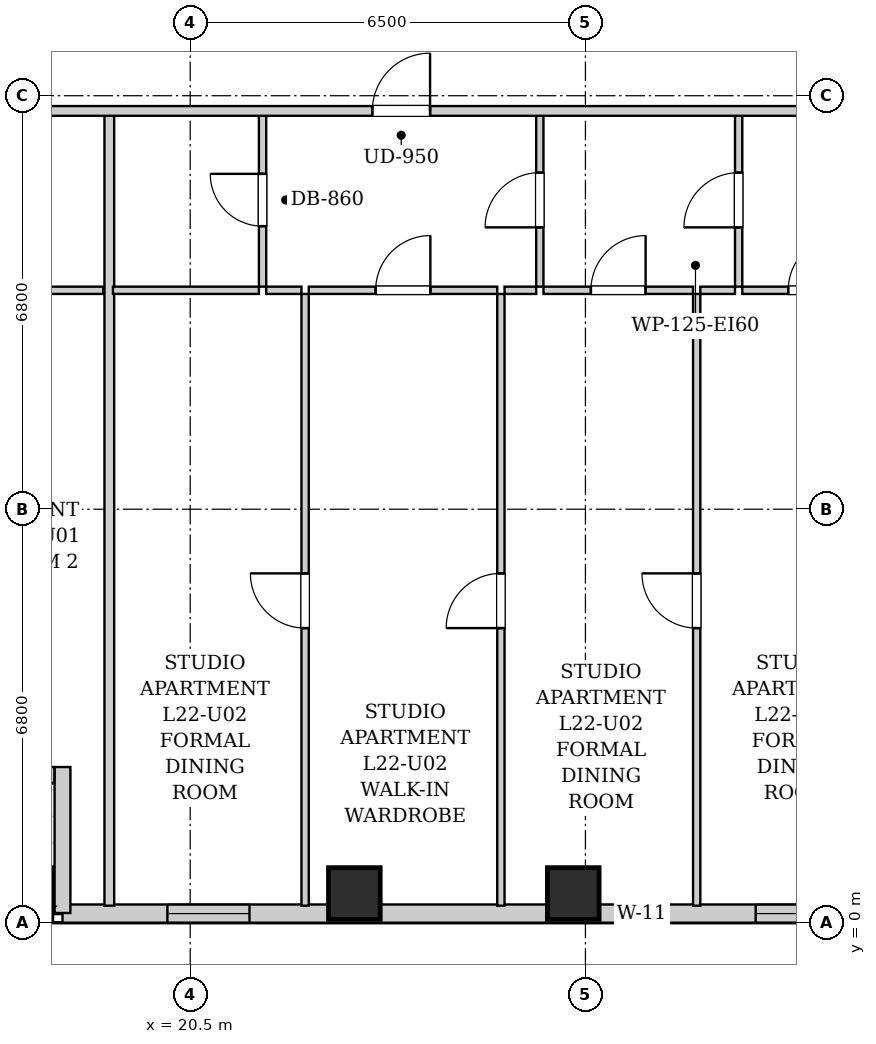
"""IFC4 building model, lengths in metres.
Left out: names, types, materials, properties, quantities, classifications, styles, units other than length and angle.
Written with IfcOpenShell. Run it as: python <this file> out.ifc"""

import sys

from ifc_helpers import new_model, si_unit, direction, frame, frame_2d, origin, origin_2d, place, context, subcontext, project, spatial, rectangle, extrude, element, fill, save


model = new_model("IFC4")
c1 = context("Model", 3, precision=1e-05, world=origin(), true_north=direction((0.0, 1.0)))
c2 = subcontext(c1, "Body", "Model", "MODEL_VIEW")
j1 = project(units=[si_unit("LENGTHUNIT", "METRE"), si_unit("PLANEANGLEUNIT", "RADIAN")], contexts=[c1])
p1 = place(None, origin())
s1 = spatial("IfcSite", under=j1, at=p1, CompositionType="ELEMENT")
p2 = place(p1, origin())
s2 = spatial("IfcBuilding", under=s1, at=p2, CompositionType="ELEMENT")
p3 = place(p2, frame((0.0, 0.0, 81.5)))
s3 = spatial("IfcBuildingStorey", under=s2, at=p3, CompositionType="ELEMENT", Elevation=81.5)
for number, where, z_axis, x_axis in (
    (1, (23.2, 0.48, 0.0), (0.0, 0.0, 1.0), (1.0, 0.0, 0.0)),
    (2, (26.8, 0.48, 0.0), (0.0, 0.0, 1.0), (1.0, 0.0, 0.0)),
):
    element("IfcColumn", number, at=place(p3, frame(where, z_axis=z_axis, x_axis=x_axis)), inside=s3, PredefinedType="COLUMN", context=c2, shape_type="SweptSolid", body=[
        extrude(rectangle(XDim=0.85, YDim=0.85, at=origin_2d()), origin(), (0.0, 0.0, 1.0), 3.2),
    ])
p4 = place(p3, frame((40.9, 0.15, 0.0), z_axis=(0.0, 0.0, 1.0), x_axis=(-1.0, 0.0, 0.0)))
e3 = element("IfcWall", 3, at=p4, inside=s3, PredefinedType="SOLIDWALL", context=c2, shape_type="SweptSolid", body=[
    extrude(rectangle(XDim=22.5, YDim=0.3, at=frame_2d((11.25, 0.0))), origin(), (0.0, 0.0, 1.0), 2.94),
])
p5 = place(p4, frame((19.425, 0.0, 0.55)))
e4 = element("IfcOpeningElement", 4, at=p5, cuts=e3, PredefinedType="OPENING", context=c2, shape_type="SweptSolid", body=[
    extrude(rectangle(XDim=1.35, YDim=1.2, at=frame_2d((0.675, 0.6))), frame((0.0, 0.16, 0.0), z_axis=(0.0, -1.0, 0.0), x_axis=(1.0, 0.0, 0.0)), (0.0, 0.0, 1.0), 0.32),
])
p6 = place(p4, frame((12.55, 0.0, 0.55)))
e5 = element("IfcOpeningElement", 5, at=p6, cuts=e3, PredefinedType="OPENING", context=c2, shape_type="SweptSolid", body=[
    extrude(rectangle(XDim=0.85, YDim=1.2, at=frame_2d((0.425, 0.6))), frame((0.0, 0.16, 0.0), z_axis=(0.0, -1.0, 0.0), x_axis=(1.0, 0.0, 0.0)), (0.0, 0.0, 1.0), 0.32),
])
p7 = place(p4, frame((9.75, 0.0, 0.55)))
e6 = element("IfcOpeningElement", 6, at=p7, cuts=e3, PredefinedType="OPENING", context=c2, shape_type="SweptSolid", body=[
    extrude(rectangle(XDim=1.35, YDim=1.2, at=frame_2d((0.675, 0.6))), frame((0.0, 0.16, 0.0), z_axis=(0.0, -1.0, 0.0), x_axis=(1.0, 0.0, 0.0)), (0.0, 0.0, 1.0), 0.32),
])
p8 = place(p4, frame((6.265, 0.0, 0.55)))
e7 = element("IfcOpeningElement", 7, at=p8, cuts=e3, PredefinedType="OPENING", context=c2, shape_type="SweptSolid", body=[
    extrude(rectangle(XDim=0.85, YDim=1.2, at=frame_2d((0.425, 0.6))), frame((0.0, 0.16, 0.0), z_axis=(0.0, -1.0, 0.0), x_axis=(1.0, 0.0, 0.0)), (0.0, 0.0, 1.0), 0.32),
])
p9 = place(p4, frame((2.325, 0.0, 0.55)))
e8 = element("IfcOpeningElement", 8, at=p9, cuts=e3, PredefinedType="OPENING", context=c2, shape_type="SweptSolid", body=[
    extrude(rectangle(XDim=1.35, YDim=1.2, at=frame_2d((0.675, 0.6))), frame((0.0, 0.16, 0.0), z_axis=(0.0, -1.0, 0.0), x_axis=(1.0, 0.0, 0.0)), (0.0, 0.0, 1.0), 0.32),
])
p10 = place(p3, frame((18.4, 0.16, 0.0), z_axis=(0.0, 0.0, 1.0), x_axis=(0.0, 1.0, 0.0)))
e9 = element("IfcWall", 9, at=p10, inside=s3, PredefinedType="SOLIDWALL", context=c2, shape_type="SweptSolid", body=[
    extrude(rectangle(XDim=2.4, YDim=0.26, at=frame_2d((1.2, 0.0))), origin(), (0.0, 0.0, 1.0), 2.94),
])
p11 = place(p3, frame((18.266, 2.43, 0.0), z_axis=(0.0, 0.0, 1.0), x_axis=(-1.0, 0.0, 0.0)))
e10 = element("IfcWall", 10, at=p11, inside=s3, PredefinedType="SOLIDWALL", context=c2, shape_type="SweptSolid", body=[
    extrude(rectangle(XDim=4.882, YDim=0.26, at=frame_2d((2.441, 0.0))), origin(), (0.0, 0.0, 1.0), 2.94),
])
p12 = place(p11, frame((2.316, 0.0, 0.0)))
e11 = element("IfcOpeningElement", 11, at=p12, cuts=e10, PredefinedType="OPENING", context=c2, shape_type="SweptSolid", body=[
    extrude(rectangle(XDim=1.1, YDim=2.0, at=frame_2d((0.55, 1.0))), frame((0.0, 0.14, 0.0), z_axis=(0.0, -1.0, 0.0), x_axis=(1.0, 0.0, 0.0)), (0.0, 0.0, 1.0), 0.28),
])
p13 = place(p11, frame((3.576, 0.0, 0.55)))
e12 = element("IfcOpeningElement", 12, at=p13, cuts=e10, PredefinedType="OPENING", context=c2, shape_type="SweptSolid", body=[
    extrude(rectangle(XDim=0.85, YDim=1.2, at=frame_2d((0.425, 0.6))), frame((0.0, 0.14, 0.0), z_axis=(0.0, -1.0, 0.0), x_axis=(1.0, 0.0, 0.0)), (0.0, 0.0, 1.0), 0.28),
])
p14 = place(p11, frame((0.545, 0.0, 0.55)))
e13 = element("IfcOpeningElement", 13, at=p14, cuts=e10, PredefinedType="OPENING", context=c2, shape_type="SweptSolid", body=[
    extrude(rectangle(XDim=1.35, YDim=1.2, at=frame_2d((0.675, 0.6))), frame((0.0, 0.14, 0.0), z_axis=(0.0, -1.0, 0.0), x_axis=(1.0, 0.0, 0.0)), (0.0, 0.0, 1.0), 0.28),
])
p15 = place(p3, frame((16.17, 10.4, 0.0), z_axis=(0.0, 0.0, 1.0), x_axis=(1.0, 0.0, 0.0)))
e14 = element("IfcWall", 14, at=p15, inside=s3, PredefinedType="PARTITIONING", context=c2, shape_type="SweptSolid", body=[
    extrude(rectangle(XDim=2.9, YDim=0.12, at=frame_2d((1.45, 0.0))), origin(), (0.0, 0.0, 1.0), 2.94),
])
p16 = place(p15, frame((1.0, 0.0, 0.0)))
e15 = element("IfcOpeningElement", 15, at=p16, cuts=e14, PredefinedType="OPENING", context=c2, shape_type="SweptSolid", body=[
    extrude(rectangle(XDim=0.9, YDim=2.05, at=frame_2d((0.45, 1.025))), frame((0.0, 0.07, 0.0), z_axis=(0.0, -1.0, 0.0), x_axis=(1.0, 0.0, 0.0)), (0.0, 0.0, 1.0), 0.14),
])
p17 = place(p3, frame((19.17, 0.28, 0.0), z_axis=(0.0, 0.0, 1.0), x_axis=(0.0, 1.0, 0.0)))
e16 = element("IfcWall", 16, at=p17, inside=s3, PredefinedType="PARTITIONING", context=c2, shape_type="SweptSolid", body=[
    extrude(rectangle(XDim=13.03, YDim=0.16, at=frame_2d((6.515, 0.0))), origin(), (0.0, 0.0, 1.0), 2.94),
])
p18 = place(p3, frame((21.69, 10.46, 0.0), z_axis=(0.0, 0.0, 1.0), x_axis=(0.0, 1.0, 0.0)))
e17 = element("IfcWall", 17, at=p18, inside=s3, PredefinedType="PARTITIONING", context=c2, shape_type="SweptSolid", body=[
    extrude(rectangle(XDim=2.85, YDim=0.12, at=frame_2d((1.425, 0.0))), origin(), (0.0, 0.0, 1.0), 2.94),
])
p19 = place(p18, frame((0.995, 0.0, 0.0)))
e18 = element("IfcOpeningElement", 18, at=p19, cuts=e17, PredefinedType="OPENING", context=c2, shape_type="SweptSolid", body=[
    extrude(rectangle(XDim=0.86, YDim=2.05, at=frame_2d((0.43, 1.025))), frame((0.0, 0.07, 0.0), z_axis=(0.0, -1.0, 0.0), x_axis=(1.0, 0.0, 0.0)), (0.0, 0.0, 1.0), 0.14),
])
p20 = place(p3, frame((19.23, 10.4, 0.0), z_axis=(0.0, 0.0, 1.0), x_axis=(1.0, 0.0, 0.0)))
e19 = element("IfcWall", 19, at=p20, inside=s3, PredefinedType="PARTITIONING", context=c2, shape_type="SweptSolid", body=[
    extrude(rectangle(XDim=2.4, YDim=0.12, at=frame_2d((1.2, 0.0))), origin(), (0.0, 0.0, 1.0), 2.94),
])
p21 = place(p3, frame((26.25, 10.46, 0.0), z_axis=(0.0, 0.0, 1.0), x_axis=(0.0, 1.0, 0.0)))
e20 = element("IfcWall", 20, at=p21, inside=s3, PredefinedType="PARTITIONING", context=c2, shape_type="SweptSolid", body=[
    extrude(rectangle(XDim=2.85, YDim=0.12, at=frame_2d((1.425, 0.0))), origin(), (0.0, 0.0, 1.0), 2.94),
])
p22 = place(p21, frame((0.975, 0.0, 0.0)))
e21 = element("IfcOpeningElement", 21, at=p22, cuts=e20, PredefinedType="OPENING", context=c2, shape_type="SweptSolid", body=[
    extrude(rectangle(XDim=0.9, YDim=2.05, at=frame_2d((0.45, 1.025))), frame((0.0, 0.07, 0.0), z_axis=(0.0, -1.0, 0.0), x_axis=(1.0, 0.0, 0.0)), (0.0, 0.0, 1.0), 0.14),
])
p23 = place(p3, frame((21.75, 10.4, 0.0), z_axis=(0.0, 0.0, 1.0), x_axis=(1.0, 0.0, 0.0)))
e22 = element("IfcWall", 22, at=p23, inside=s3, PredefinedType="PARTITIONING", context=c2, shape_type="SweptSolid", body=[
    extrude(rectangle(XDim=0.58, YDim=0.12, at=frame_2d((0.29, 0.0))), origin(), (0.0, 0.0, 1.0), 2.94),
])
p24 = place(p3, frame((22.45, 10.4, 0.0), z_axis=(0.0, 0.0, 1.0), x_axis=(1.0, 0.0, 0.0)))
e23 = element("IfcWall", 23, at=p24, inside=s3, PredefinedType="PARTITIONING", context=c2, shape_type="SweptSolid", body=[
    extrude(rectangle(XDim=3.1, YDim=0.12, at=frame_2d((1.55, 0.0))), origin(), (0.0, 0.0, 1.0), 2.94),
])
p25 = place(p24, frame((1.1, 0.0, 0.0)))
e24 = element("IfcOpeningElement", 24, at=p25, cuts=e23, PredefinedType="OPENING", context=c2, shape_type="SweptSolid", body=[
    extrude(rectangle(XDim=0.9, YDim=2.05, at=frame_2d((0.45, 1.025))), frame((0.0, 0.07, 0.0), z_axis=(0.0, -1.0, 0.0), x_axis=(1.0, 0.0, 0.0)), (0.0, 0.0, 1.0), 0.14),
])
p26 = place(p3, frame((25.67, 10.4, 0.0), z_axis=(0.0, 0.0, 1.0), x_axis=(1.0, 0.0, 0.0)))
e25 = element("IfcWall", 25, at=p26, inside=s3, PredefinedType="PARTITIONING", context=c2, shape_type="SweptSolid", body=[
    extrude(rectangle(XDim=0.52, YDim=0.12, at=frame_2d((0.26, 0.0))), origin(), (0.0, 0.0, 1.0), 2.94),
])
p27 = place(p3, frame((29.52, 10.46, 0.0), z_axis=(0.0, 0.0, 1.0), x_axis=(0.0, 1.0, 0.0)))
e26 = element("IfcWall", 26, at=p27, inside=s3, PredefinedType="PARTITIONING", context=c2, shape_type="SweptSolid", body=[
    extrude(rectangle(XDim=2.85, YDim=0.12, at=frame_2d((1.425, 0.0))), origin(), (0.0, 0.0, 1.0), 2.94),
])
p28 = place(p27, frame((0.975, 0.0, 0.0)))
e27 = element("IfcOpeningElement", 27, at=p28, cuts=e26, PredefinedType="OPENING", context=c2, shape_type="SweptSolid", body=[
    extrude(rectangle(XDim=0.9, YDim=2.05, at=frame_2d((0.45, 1.025))), frame((0.0, 0.07, 0.0), z_axis=(0.0, -1.0, 0.0), x_axis=(1.0, 0.0, 0.0)), (0.0, 0.0, 1.0), 0.14),
])
p29 = place(p3, frame((26.31, 10.4, 0.0), z_axis=(0.0, 0.0, 1.0), x_axis=(1.0, 0.0, 0.0)))
e28 = element("IfcWall", 28, at=p29, inside=s3, PredefinedType="PARTITIONING", context=c2, shape_type="SweptSolid", body=[
    extrude(rectangle(XDim=2.46, YDim=0.12, at=frame_2d((1.23, 0.0))), origin(), (0.0, 0.0, 1.0), 2.94),
])
p30 = place(p29, frame((0.78, 0.0, 0.0)))
e29 = element("IfcOpeningElement", 29, at=p30, cuts=e28, PredefinedType="OPENING", context=c2, shape_type="SweptSolid", body=[
    extrude(rectangle(XDim=0.9, YDim=2.05, at=frame_2d((0.45, 1.025))), frame((0.0, 0.07, 0.0), z_axis=(0.0, -1.0, 0.0), x_axis=(1.0, 0.0, 0.0)), (0.0, 0.0, 1.0), 0.14),
])
p31 = place(p3, frame((28.89, 10.4, 0.0), z_axis=(0.0, 0.0, 1.0), x_axis=(1.0, 0.0, 0.0)))
e30 = element("IfcWall", 30, at=p31, inside=s3, PredefinedType="PARTITIONING", context=c2, shape_type="SweptSolid", body=[
    extrude(rectangle(XDim=0.57, YDim=0.12, at=frame_2d((0.285, 0.0))), origin(), (0.0, 0.0, 1.0), 2.94),
])
p32 = place(p3, frame((29.58, 10.4, 0.0), z_axis=(0.0, 0.0, 1.0), x_axis=(1.0, 0.0, 0.0)))
e31 = element("IfcWall", 31, at=p32, inside=s3, PredefinedType="PARTITIONING", context=c2, shape_type="SweptSolid", body=[
    extrude(rectangle(XDim=2.41, YDim=0.12, at=frame_2d((1.205, 0.0))), origin(), (0.0, 0.0, 1.0), 2.94),
])
p33 = place(p32, frame((0.755, 0.0, 0.0)))
e32 = element("IfcOpeningElement", 32, at=p33, cuts=e31, PredefinedType="OPENING", context=c2, shape_type="SweptSolid", body=[
    extrude(rectangle(XDim=0.9, YDim=2.05, at=frame_2d((0.45, 1.025))), frame((0.0, 0.07, 0.0), z_axis=(0.0, -1.0, 0.0), x_axis=(1.0, 0.0, 0.0)), (0.0, 0.0, 1.0), 0.14),
])
p34 = place(p3, frame((22.39, 0.28, 0.0), z_axis=(0.0, 0.0, 1.0), x_axis=(0.0, 1.0, 0.0)))
e33 = element("IfcWall", 33, at=p34, inside=s3, PredefinedType="PARTITIONING", context=c2, shape_type="SweptSolid", body=[
    extrude(rectangle(XDim=10.06, YDim=0.12, at=frame_2d((5.03, 0.0))), origin(), (0.0, 0.0, 1.0), 2.94),
])
p35 = place(p34, frame((4.565, 0.0, 0.0)))
e34 = element("IfcOpeningElement", 34, at=p35, cuts=e33, PredefinedType="OPENING", context=c2, shape_type="SweptSolid", body=[
    extrude(rectangle(XDim=0.9, YDim=2.05, at=frame_2d((0.45, 1.025))), frame((0.0, 0.07, 0.0), z_axis=(0.0, -1.0, 0.0), x_axis=(1.0, 0.0, 0.0)), (0.0, 0.0, 1.0), 0.14),
])
p36 = place(p3, frame((25.61, 0.28, 0.0), z_axis=(0.0, 0.0, 1.0), x_axis=(0.0, 1.0, 0.0)))
e35 = element("IfcWall", 35, at=p36, inside=s3, PredefinedType="PARTITIONING", context=c2, shape_type="SweptSolid", body=[
    extrude(rectangle(XDim=10.06, YDim=0.12, at=frame_2d((5.03, 0.0))), origin(), (0.0, 0.0, 1.0), 2.94),
])
p37 = place(p36, frame((4.565, 0.0, 0.0)))
e36 = element("IfcOpeningElement", 36, at=p37, cuts=e35, PredefinedType="OPENING", context=c2, shape_type="SweptSolid", body=[
    extrude(rectangle(XDim=0.9, YDim=2.05, at=frame_2d((0.45, 1.025))), frame((0.0, 0.07, 0.0), z_axis=(0.0, -1.0, 0.0), x_axis=(1.0, 0.0, 0.0)), (0.0, 0.0, 1.0), 0.14),
])
p38 = place(p3, frame((28.83, 0.28, 0.0), z_axis=(0.0, 0.0, 1.0), x_axis=(0.0, 1.0, 0.0)))
e37 = element("IfcWall", 37, at=p38, inside=s3, PredefinedType="PARTITIONING", context=c2, shape_type="SweptSolid", body=[
    extrude(rectangle(XDim=10.06, YDim=0.12, at=frame_2d((5.03, 0.0))), origin(), (0.0, 0.0, 1.0), 2.94),
])
p39 = place(p38, frame((4.565, 0.0, 0.0)))
e38 = element("IfcOpeningElement", 38, at=p39, cuts=e37, PredefinedType="OPENING", context=c2, shape_type="SweptSolid", body=[
    extrude(rectangle(XDim=0.9, YDim=2.05, at=frame_2d((0.45, 1.025))), frame((0.0, 0.07, 0.0), z_axis=(0.0, -1.0, 0.0), x_axis=(1.0, 0.0, 0.0)), (0.0, 0.0, 1.0), 0.14),
])
p40 = place(p3, frame((10.05, 13.35, 0.0), z_axis=(0.0, 0.0, 1.0), x_axis=(1.0, 0.0, 0.0)))
e39 = element("IfcWall", 39, at=p40, inside=s3, PredefinedType="PARTITIONING", context=c2, shape_type="SweptSolid", body=[
    extrude(rectangle(XDim=30.8, YDim=0.16, at=frame_2d((15.4, 0.0))), origin(), (0.0, 0.0, 1.0), 2.94),
])
p41 = place(p40, frame((3.8, 0.0, 0.0)))
e40 = element("IfcOpeningElement", 40, at=p41, cuts=e39, PredefinedType="OPENING", context=c2, shape_type="SweptSolid", body=[
    extrude(rectangle(XDim=0.95, YDim=2.1, at=frame_2d((0.475, 1.05))), frame((0.0, 0.09, 0.0), z_axis=(0.0, -1.0, 0.0), x_axis=(1.0, 0.0, 0.0)), (0.0, 0.0, 1.0), 0.18),
])
p42 = place(p40, frame((13.445, 0.0, 0.0)))
e41 = element("IfcOpeningElement", 41, at=p42, cuts=e39, PredefinedType="OPENING", context=c2, shape_type="SweptSolid", body=[
    extrude(rectangle(XDim=0.95, YDim=2.1, at=frame_2d((0.475, 1.05))), frame((0.0, 0.09, 0.0), z_axis=(0.0, -1.0, 0.0), x_axis=(1.0, 0.0, 0.0)), (0.0, 0.0, 1.0), 0.18),
])
p43 = place(p19, origin())
e42 = element("IfcDoor", 42, at=p43, inside=s3, OperationType="SINGLE_SWING_RIGHT", PredefinedType="DOOR", context=c2, shape_type="SweptSolid", body=[
    extrude(rectangle(XDim=0.86, YDim=2.05, at=frame_2d((0.43, 1.025))), frame((0.0, 0.025, 0.0), z_axis=(0.0, -1.0, 0.0), x_axis=(1.0, 0.0, 0.0)), (0.0, 0.0, 1.0), 0.05),
])
fill(e18, e42)
p44 = place(p22, origin())
e43 = element("IfcDoor", 43, at=p44, inside=s3, OperationType="SINGLE_SWING_LEFT", PredefinedType="DOOR", context=c2, shape_type="SweptSolid", body=[
    extrude(rectangle(XDim=0.9, YDim=2.05, at=frame_2d((0.45, 1.025))), frame((0.0, 0.025, 0.0), z_axis=(0.0, -1.0, 0.0), x_axis=(1.0, 0.0, 0.0)), (0.0, 0.0, 1.0), 0.05),
])
fill(e21, e43)
p45 = place(p25, origin())
e44 = element("IfcDoor", 44, at=p45, inside=s3, OperationType="SINGLE_SWING_RIGHT", PredefinedType="DOOR", context=c2, shape_type="SweptSolid", body=[
    extrude(rectangle(XDim=0.9, YDim=2.05, at=frame_2d((0.45, 1.025))), frame((0.0, 0.025, 0.0), z_axis=(0.0, -1.0, 0.0), x_axis=(1.0, 0.0, 0.0)), (0.0, 0.0, 1.0), 0.05),
])
fill(e24, e44)
p46 = place(p28, origin())
e45 = element("IfcDoor", 45, at=p46, inside=s3, OperationType="SINGLE_SWING_LEFT", PredefinedType="DOOR", context=c2, shape_type="SweptSolid", body=[
    extrude(rectangle(XDim=0.9, YDim=2.05, at=frame_2d((0.45, 1.025))), frame((0.0, 0.025, 0.0), z_axis=(0.0, -1.0, 0.0), x_axis=(1.0, 0.0, 0.0)), (0.0, 0.0, 1.0), 0.05),
])
fill(e27, e45)
p47 = place(p30, origin())
e46 = element("IfcDoor", 46, at=p47, inside=s3, OperationType="SINGLE_SWING_RIGHT", PredefinedType="DOOR", context=c2, shape_type="SweptSolid", body=[
    extrude(rectangle(XDim=0.9, YDim=2.05, at=frame_2d((0.45, 1.025))), frame((0.0, 0.025, 0.0), z_axis=(0.0, -1.0, 0.0), x_axis=(1.0, 0.0, 0.0)), (0.0, 0.0, 1.0), 0.05),
])
fill(e29, e46)
p48 = place(p33, origin())
e47 = element("IfcDoor", 47, at=p48, inside=s3, OperationType="SINGLE_SWING_RIGHT", PredefinedType="DOOR", context=c2, shape_type="SweptSolid", body=[
    extrude(rectangle(XDim=0.9, YDim=2.05, at=frame_2d((0.45, 1.025))), frame((0.0, 0.025, 0.0), z_axis=(0.0, -1.0, 0.0), x_axis=(1.0, 0.0, 0.0)), (0.0, 0.0, 1.0), 0.05),
])
fill(e32, e47)
p49 = place(p35, origin())
e48 = element("IfcDoor", 48, at=p49, inside=s3, OperationType="SINGLE_SWING_RIGHT", PredefinedType="DOOR", context=c2, shape_type="SweptSolid", body=[
    extrude(rectangle(XDim=0.9, YDim=2.05, at=frame_2d((0.45, 1.025))), frame((0.0, 0.025, 0.0), z_axis=(0.0, -1.0, 0.0), x_axis=(1.0, 0.0, 0.0)), (0.0, 0.0, 1.0), 0.05),
])
fill(e34, e48)
p50 = place(p37, origin())
e49 = element("IfcDoor", 49, at=p50, inside=s3, OperationType="SINGLE_SWING_LEFT", PredefinedType="DOOR", context=c2, shape_type="SweptSolid", body=[
    extrude(rectangle(XDim=0.9, YDim=2.05, at=frame_2d((0.45, 1.025))), frame((0.0, 0.025, 0.0), z_axis=(0.0, -1.0, 0.0), x_axis=(1.0, 0.0, 0.0)), (0.0, 0.0, 1.0), 0.05),
])
fill(e36, e49)
p51 = place(p39, origin())
e50 = element("IfcDoor", 50, at=p51, inside=s3, OperationType="SINGLE_SWING_RIGHT", PredefinedType="DOOR", context=c2, shape_type="SweptSolid", body=[
    extrude(rectangle(XDim=0.9, YDim=2.05, at=frame_2d((0.45, 1.025))), frame((0.0, 0.025, 0.0), z_axis=(0.0, -1.0, 0.0), x_axis=(1.0, 0.0, 0.0)), (0.0, 0.0, 1.0), 0.05),
])
fill(e38, e50)
p52 = place(p42, origin())
e51 = element("IfcDoor", 51, at=p52, inside=s3, OperationType="SINGLE_SWING_RIGHT", PredefinedType="DOOR", context=c2, shape_type="SweptSolid", body=[
    extrude(rectangle(XDim=0.95, YDim=2.1, at=frame_2d((0.475, 1.05))), frame((0.0, 0.025, 0.0), z_axis=(0.0, -1.0, 0.0), x_axis=(1.0, 0.0, 0.0)), (0.0, 0.0, 1.0), 0.05),
])
fill(e41, e51)
p53 = place(p5, origin())
e52 = element("IfcWindow", 52, at=p53, inside=s3, PartitioningType="SINGLE_PANEL", PredefinedType="WINDOW", context=c2, shape_type="SweptSolid", body=[
    extrude(rectangle(XDim=1.35, YDim=1.2, at=frame_2d((0.675, 0.6))), frame((0.0, 0.03, 0.0), z_axis=(0.0, -1.0, 0.0), x_axis=(1.0, 0.0, 0.0)), (0.0, 0.0, 1.0), 0.06),
])
fill(e4, e52)
p54 = place(p6, origin())
e53 = element("IfcWindow", 53, at=p54, inside=s3, PartitioningType="SINGLE_PANEL", PredefinedType="WINDOW", context=c2, shape_type="SweptSolid", body=[
    extrude(rectangle(XDim=0.85, YDim=1.2, at=frame_2d((0.425, 0.6))), frame((0.0, 0.03, 0.0), z_axis=(0.0, -1.0, 0.0), x_axis=(1.0, 0.0, 0.0)), (0.0, 0.0, 1.0), 0.06),
])
fill(e5, e53)
p55 = place(p7, origin())
e54 = element("IfcWindow", 54, at=p55, inside=s3, PartitioningType="SINGLE_PANEL", PredefinedType="WINDOW", context=c2, shape_type="SweptSolid", body=[
    extrude(rectangle(XDim=1.35, YDim=1.2, at=frame_2d((0.675, 0.6))), frame((0.0, 0.03, 0.0), z_axis=(0.0, -1.0, 0.0), x_axis=(1.0, 0.0, 0.0)), (0.0, 0.0, 1.0), 0.06),
])
fill(e6, e54)
save(model, sys.argv[1])
